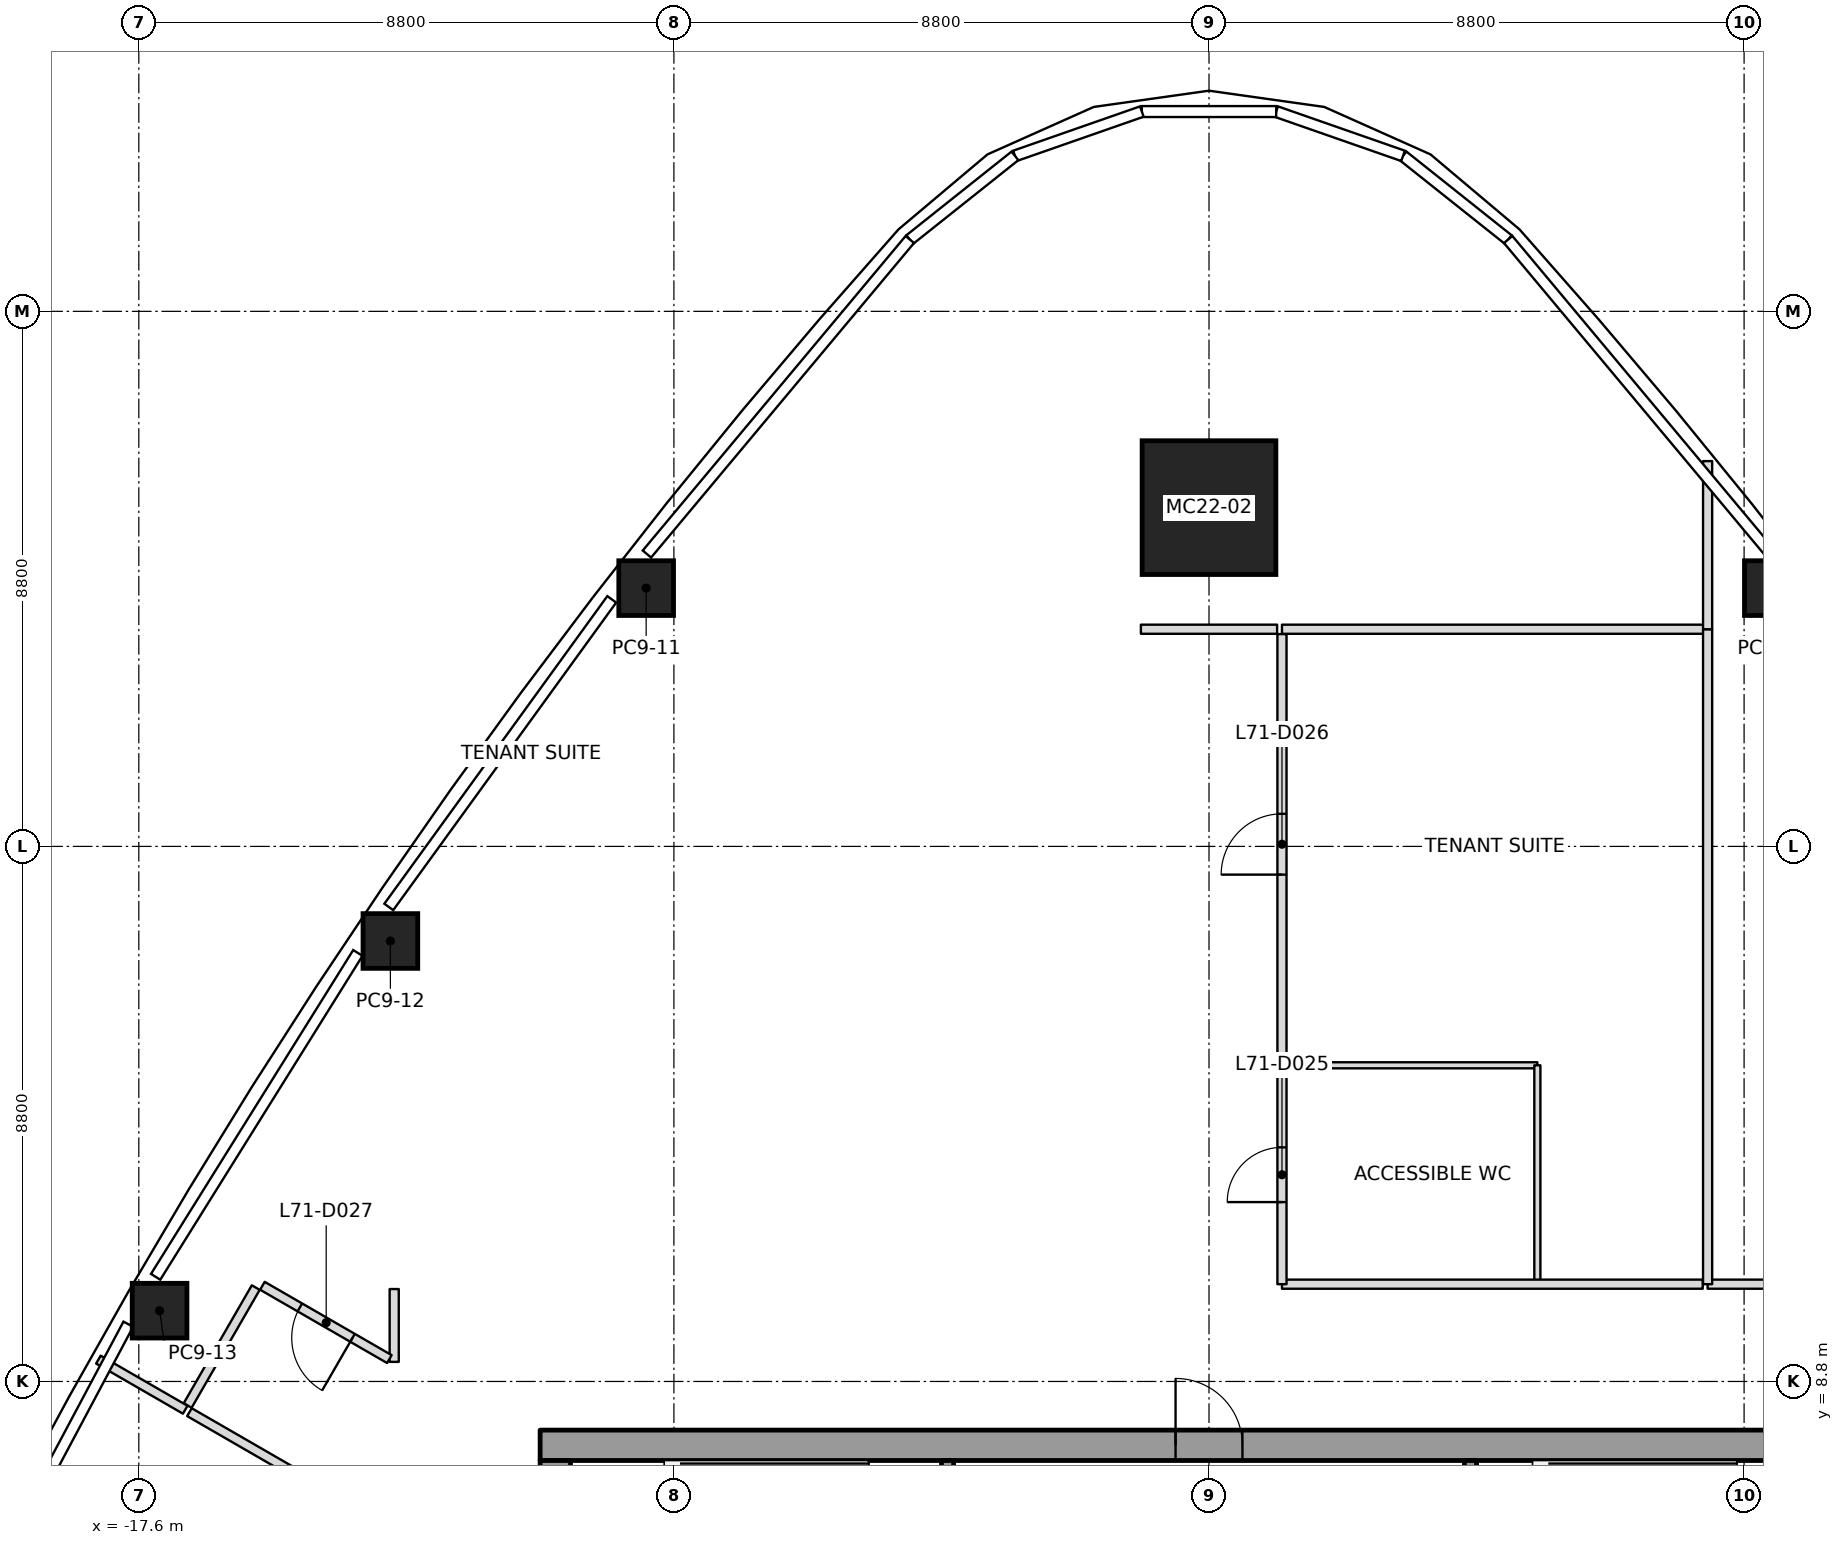
"""IFC4 building model, lengths in metres.
Left out: names, types, materials, properties, quantities, classifications, styles, units other than length and angle.
Written with IfcOpenShell. Run it as: python <this file> out.ifc"""

import sys

from ifc_helpers import new_model, si_unit, direction, frame, frame_2d, origin, origin_2d, place, context, subcontext, project, spatial, rectangle, extrude, element, fill, save


model = new_model("IFC4")
c1 = context("Model", 3, precision=1e-05, world=origin(), true_north=direction((0.0, 1.0)))
c2 = subcontext(c1, "Body", "Model", "MODEL_VIEW")
j1 = project(units=[si_unit("LENGTHUNIT", "METRE"), si_unit("PLANEANGLEUNIT", "RADIAN")], contexts=[c1])
p1 = place(None, origin())
s1 = spatial("IfcSite", under=j1, at=p1, CompositionType="ELEMENT")
p2 = place(p1, origin())
s2 = spatial("IfcBuilding", under=s1, at=p2, CompositionType="ELEMENT")
p3 = place(p2, frame((0.0, 0.0, 311.0)))
s3 = spatial("IfcBuildingStorey", under=s2, at=p3, CompositionType="ELEMENT", Elevation=311.0)
p4 = place(p3, frame((0.0, 23.172, 0.0), z_axis=(0.0, -0.031966077398, 0.999488954364), x_axis=(1.0, 0.0, 0.0)))
e1 = element("IfcColumn", 1, at=p4, inside=s3, PredefinedType="COLUMN", context=c2, shape_type="SweptSolid", body=[
    extrude(rectangle(XDim=2.2, YDim=2.2, at=origin_2d()), origin(), (0.0, 0.0, 1.0), 4.002),
])
for number, where, z_axis, x_axis in (
    (2, (9.256, 21.848, 0.0), (-0.0, -0.02, 1.0), (-0.614, 0.789, 0.016)),
    (3, (-9.256, 21.848, 0.0), (0.0, -0.02, 1.0), (0.614, 0.789, 0.016)),
):
    element("IfcColumn", number, at=place(p3, frame(where, z_axis=z_axis, x_axis=x_axis)), inside=s3, PredefinedType="COLUMN", context=c2, shape_type="SweptSolid", body=[
        extrude(rectangle(XDim=0.9, YDim=0.9, at=origin_2d()), origin(), (0.0, 0.0, 1.0), 4.001),
    ])
p5 = place(p3, frame((-13.463, 16.044, 0.0), z_axis=(0.00530952661, -0.013121243922, 0.999899815924), x_axis=(0.558539524226, 0.829440110709, 0.007918498852)))
e4 = element("IfcColumn", 4, at=p5, inside=s3, PredefinedType="COLUMN", context=c2, shape_type="SweptSolid", body=[
    extrude(rectangle(XDim=0.9, YDim=0.9, at=origin_2d()), origin(), (0.0, 0.0, 1.0), 4.0),
])
p6 = place(p3, frame((-17.259, 9.964, 0.0), z_axis=(0.009887049298, -0.00573692984, 0.999934664812), x_axis=(0.499975560967, 0.866039512843, 2.5126546e-05)))
e5 = element("IfcColumn", 5, at=p6, inside=s3, PredefinedType="COLUMN", context=c2, shape_type="SweptSolid", body=[
    extrude(rectangle(XDim=0.9, YDim=0.9, at=origin_2d()), origin(), (0.0, 0.0, 1.0), 4.0),
])
p7 = place(p3, frame((-11.0, 7.75, 0.0), z_axis=(0.0, 0.0, 1.0), x_axis=(1.0, 0.0, 0.0)))
e6 = element("IfcWall", 6, at=p7, inside=s3, PredefinedType="SHEAR", context=c2, shape_type="SweptSolid", body=[
    extrude(rectangle(XDim=22.0, YDim=0.5, at=frame_2d((11.0, 0.0))), origin(), (0.0, 0.0, 1.0), 4.0),
])
p8 = place(p7, frame((10.45, 0.0, 0.0)))
e7 = element("IfcOpeningElement", 7, at=p8, cuts=e6, PredefinedType="OPENING", context=c2, shape_type="SweptSolid", body=[
    extrude(rectangle(XDim=1.1, YDim=2.1, at=frame_2d((0.55, 1.05))), frame((0.0, 0.25, 0.0), z_axis=(0.0, -1.0, 0.0), x_axis=(1.0, 0.0, 0.0)), (0.0, 0.0, 1.0), 0.5),
])
p9 = place(p3, frame((-10.75, -7.5, 0.0), z_axis=(0.0, 0.0, 1.0), x_axis=(0.0, 1.0, 0.0)))
e8 = element("IfcWall", 8, at=p9, inside=s3, PredefinedType="SHEAR", context=c2, shape_type="SweptSolid", body=[
    extrude(rectangle(XDim=15.0, YDim=0.5, at=frame_2d((7.5, 0.0))), origin(), (0.0, 0.0, 1.0), 4.0),
])
p10 = place(p9, frame((6.6, 0.0, 0.0)))
e9 = element("IfcOpeningElement", 9, at=p10, cuts=e8, PredefinedType="OPENING", context=c2, shape_type="SweptSolid", body=[
    extrude(rectangle(XDim=1.8, YDim=2.1, at=frame_2d((0.9, 1.05))), frame((0.0, 0.25, 0.0), z_axis=(0.0, -1.0, 0.0), x_axis=(1.0, 0.0, 0.0)), (0.0, 0.0, 1.0), 0.5),
])
p11 = place(p3, frame((-4.3, 4.6, 0.0), z_axis=(0.0, 0.0, 1.0), x_axis=(0.0, 1.0, 0.0)))
e10 = element("IfcWall", 10, at=p11, inside=s3, PredefinedType="SOLIDWALL", context=c2, shape_type="SweptSolid", body=[
    extrude(rectangle(XDim=2.9, YDim=0.2, at=frame_2d((1.45, 0.0))), origin(), (0.0, 0.0, 1.0), 3.85),
])
p12 = place(p11, frame((0.9, 0.0, 0.0)))
e11 = element("IfcOpeningElement", 11, at=p12, cuts=e10, PredefinedType="OPENING", context=c2, shape_type="SweptSolid", body=[
    extrude(rectangle(XDim=1.1, YDim=2.1, at=frame_2d((0.55, 1.05))), frame((0.0, 0.1, 0.0), z_axis=(0.0, -1.0, 0.0), x_axis=(1.0, 0.0, 0.0)), (0.0, 0.0, 1.0), 0.2),
])
p13 = place(p3, frame((4.3, 7.5, 0.0), z_axis=(0.0, 0.0, 1.0), x_axis=(0.0, -1.0, 0.0)))
e12 = element("IfcWall", 12, at=p13, inside=s3, PredefinedType="SOLIDWALL", context=c2, shape_type="SweptSolid", body=[
    extrude(rectangle(XDim=2.9, YDim=0.2, at=frame_2d((1.45, 0.0))), origin(), (0.0, 0.0, 1.0), 3.85),
])
p14 = place(p13, frame((0.9, 0.0, 0.0)))
e13 = element("IfcOpeningElement", 13, at=p14, cuts=e12, PredefinedType="OPENING", context=c2, shape_type="SweptSolid", body=[
    extrude(rectangle(XDim=1.1, YDim=2.1, at=frame_2d((0.55, 1.05))), frame((0.0, 0.1, 0.0), z_axis=(0.0, -1.0, 0.0), x_axis=(1.0, 0.0, 0.0)), (0.0, 0.0, 1.0), 0.2),
])
p15 = place(p3, frame((-16.837, 8.335, 0.0), z_axis=(0.0, 0.0, 1.0), x_axis=(-0.866084496772, 0.499897633972, 0.0)))
e14 = element("IfcWall", 14, at=p15, inside=s3, PredefinedType="PARTITIONING", context=c2, shape_type="SweptSolid", body=[
    extrude(rectangle(XDim=1.649, YDim=0.15, at=frame_2d((0.824, 0.0))), origin(), (0.0, 0.0, 1.0), 3.234),
])
p16 = place(p3, frame((1.2, 21.172, 0.0), z_axis=(0.0, 0.0, 1.0), x_axis=(1.0, 0.0, 0.0)))
e15 = element("IfcWall", 15, at=p16, inside=s3, PredefinedType="PARTITIONING", context=c2, shape_type="SweptSolid", body=[
    extrude(rectangle(XDim=7.0, YDim=0.15, at=frame_2d((3.5, 0.0))), origin(), (0.0, 0.0, 1.0), 3.443),
])
p17 = place(p3, frame((8.2, 10.4, 0.0), z_axis=(0.0, 0.0, 1.0), x_axis=(0.0, 1.0, 0.0)))
e16 = element("IfcWall", 16, at=p17, inside=s3, PredefinedType="PARTITIONING", context=c2, shape_type="SweptSolid", body=[
    extrude(rectangle(XDim=10.772, YDim=0.15, at=frame_2d((5.386, 0.0))), origin(), (0.0, 0.0, 1.0), 3.317),
])
p18 = place(p3, frame((8.2, 21.172, 0.0), z_axis=(0.0, 0.0, 1.0), x_axis=(0.0, 1.0, 0.0)))
e17 = element("IfcWall", 17, at=p18, inside=s3, PredefinedType="PARTITIONING", context=c2, shape_type="SweptSolid", body=[
    extrude(rectangle(XDim=2.765, YDim=0.15, at=frame_2d((1.383, 0.0))), origin(), (0.0, 0.0, 1.0), 3.234),
])
p19 = place(p3, frame((-16.768, 8.295, 0.0), z_axis=(0.0, 0.0, 1.0), x_axis=(0.866024577697, -0.500001430823, 0.0)))
e18 = element("IfcWall", 18, at=p19, inside=s3, PredefinedType="PARTITIONING", context=c2, shape_type="SweptSolid", body=[
    extrude(rectangle(XDim=3.889, YDim=0.15, at=frame_2d((1.944, 0.0))), origin(), (0.0, 0.0, 1.0), 3.45),
])
p20 = place(p3, frame((-15.677, 10.344, 0.0), z_axis=(0.0, 0.0, 1.0), x_axis=(-0.49994888933, -0.866054910533, 0.0)))
e19 = element("IfcWall", 19, at=p20, inside=s3, PredefinedType="PARTITIONING", context=c2, shape_type="SweptSolid", body=[
    extrude(rectangle(XDim=2.24, YDim=0.15, at=frame_2d((1.12, 0.0))), origin(), (0.0, 0.0, 1.0), 3.45),
])
p21 = place(p3, frame((-13.4, 10.32, 0.0), z_axis=(0.0, 0.0, 1.0), x_axis=(0.0, -1.0, 0.0)))
e20 = element("IfcWall", 20, at=p21, inside=s3, PredefinedType="PARTITIONING", context=c2, shape_type="SweptSolid", body=[
    extrude(rectangle(XDim=1.198, YDim=0.15, at=frame_2d((0.599, 0.0))), origin(), (0.0, 0.0, 1.0), 3.45),
])
p22 = place(p3, frame((-13.479, 9.168, 0.0), z_axis=(0.0, 0.0, 1.0), x_axis=(-0.866028773314, 0.499994163758, 0.0)))
e21 = element("IfcWall", 21, at=p22, inside=s3, PredefinedType="PARTITIONING", context=c2, shape_type="SweptSolid", body=[
    extrude(rectangle(XDim=2.411, YDim=0.15, at=frame_2d((1.206, 0.0))), origin(), (0.0, 0.0, 1.0), 3.45),
])
p23 = place(p22, frame((0.7, 0.0, 0.0)))
e22 = element("IfcOpeningElement", 22, at=p23, cuts=e21, PredefinedType="OPENING", context=c2, shape_type="SweptSolid", body=[
    extrude(rectangle(XDim=1.0, YDim=2.1, at=frame_2d((0.5, 1.05))), frame((0.0, 0.075, 0.0), z_axis=(0.0, -1.0, 0.0), x_axis=(1.0, 0.0, 0.0)), (0.0, 0.0, 1.0), 0.15),
])
p24 = place(p3, frame((1.12, 21.172, 0.0), z_axis=(0.0, 0.0, 1.0), x_axis=(-1.0, 0.0, 0.0)))
e23 = element("IfcWall", 23, at=p24, inside=s3, PredefinedType="PARTITIONING", context=c2, shape_type="SweptSolid", body=[
    extrude(rectangle(XDim=2.24, YDim=0.15, at=frame_2d((1.12, 0.0))), origin(), (0.0, 0.0, 1.0), 3.233),
])
p25 = place(p3, frame((8.12, 10.4, 0.0), z_axis=(0.0, 0.0, 1.0), x_axis=(-1.0, 0.0, 0.0)))
e24 = element("IfcWall", 24, at=p25, inside=s3, PredefinedType="PARTITIONING", context=c2, shape_type="SweptSolid", body=[
    extrude(rectangle(XDim=6.92, YDim=0.15, at=frame_2d((3.46, 0.0))), origin(), (0.0, 0.0, 1.0), 3.45),
])
p26 = place(p3, frame((1.2, 10.4, 0.0), z_axis=(0.0, 0.0, 1.0), x_axis=(0.0, 1.0, 0.0)))
e25 = element("IfcWall", 25, at=p26, inside=s3, PredefinedType="PARTITIONING", context=c2, shape_type="SweptSolid", body=[
    extrude(rectangle(XDim=10.692, YDim=0.15, at=frame_2d((5.346, 0.0))), origin(), (0.0, 0.0, 1.0), 3.317),
])
p27 = place(p26, frame((1.35, 0.0, 0.0)))
e26 = element("IfcOpeningElement", 26, at=p27, cuts=e25, PredefinedType="OPENING", context=c2, shape_type="SweptSolid", body=[
    extrude(rectangle(XDim=0.9, YDim=2.1, at=frame_2d((0.45, 1.05))), frame((0.0, 0.075, 0.0), z_axis=(0.0, -1.0, 0.0), x_axis=(1.0, 0.0, 0.0)), (0.0, 0.0, 1.0), 0.15),
])
p28 = place(p26, frame((6.736, 0.0, 0.0)))
e27 = element("IfcOpeningElement", 27, at=p28, cuts=e25, PredefinedType="OPENING", context=c2, shape_type="SweptSolid", body=[
    extrude(rectangle(XDim=1.0, YDim=2.1, at=frame_2d((0.5, 1.05))), frame((0.0, 0.075, 0.0), z_axis=(0.0, -1.0, 0.0), x_axis=(1.0, 0.0, 0.0)), (0.0, 0.0, 1.0), 0.15),
])
p29 = place(p3, frame((13.32, 10.4, 0.0), z_axis=(0.0, 0.0, 1.0), x_axis=(-1.0, 0.0, 0.0)))
e28 = element("IfcWall", 28, at=p29, inside=s3, PredefinedType="PARTITIONING", context=c2, shape_type="SweptSolid", body=[
    extrude(rectangle(XDim=5.12, YDim=0.15, at=frame_2d((2.56, 0.0))), origin(), (0.0, 0.0, 1.0), 3.443),
])
p30 = place(p29, frame((2.02, 0.0, 0.0)))
e29 = element("IfcOpeningElement", 29, at=p30, cuts=e28, PredefinedType="OPENING", context=c2, shape_type="SweptSolid", body=[
    extrude(rectangle(XDim=1.0, YDim=2.1, at=frame_2d((0.5, 1.05))), frame((0.0, 0.075, 0.0), z_axis=(0.0, -1.0, 0.0), x_axis=(1.0, 0.0, 0.0)), (0.0, 0.0, 1.0), 0.15),
])
p31 = place(p3, frame((1.23, 14.0, 0.0), z_axis=(0.0, 0.0, 1.0), x_axis=(1.0, 0.0, 0.0)))
e30 = element("IfcWall", 30, at=p31, inside=s3, PredefinedType="PARTITIONING", context=c2, shape_type="SweptSolid", body=[
    extrude(rectangle(XDim=4.17, YDim=0.1, at=frame_2d((2.085, 0.0))), origin(), (0.0, 0.0, 1.0), 3.45),
])
p32 = place(p3, frame((5.4, 14.0, 0.0), z_axis=(0.0, 0.0, 1.0), x_axis=(0.0, -1.0, 0.0)))
e31 = element("IfcWall", 31, at=p32, inside=s3, PredefinedType="PARTITIONING", context=c2, shape_type="SweptSolid", body=[
    extrude(rectangle(XDim=3.57, YDim=0.1, at=frame_2d((1.785, 0.0))), origin(), (0.0, 0.0, 1.0), 3.317),
])
p33 = place(p27, origin())
e32 = element("IfcDoor", 32, at=p33, inside=s3, OperationType="SINGLE_SWING_RIGHT", PredefinedType="DOOR", context=c2, shape_type="SweptSolid", body=[
    extrude(rectangle(XDim=0.9, YDim=2.1, at=frame_2d((0.45, 1.05))), frame((0.0, 0.025, 0.0), z_axis=(0.0, -1.0, 0.0), x_axis=(1.0, 0.0, 0.0)), (0.0, 0.0, 1.0), 0.05),
])
fill(e26, e32)
p34 = place(p28, origin())
e33 = element("IfcDoor", 33, at=p34, inside=s3, OperationType="SINGLE_SWING_LEFT", PredefinedType="DOOR", context=c2, shape_type="SweptSolid", body=[
    extrude(rectangle(XDim=1.0, YDim=2.1, at=frame_2d((0.5, 1.05))), frame((0.0, 0.025, 0.0), z_axis=(0.0, -1.0, 0.0), x_axis=(1.0, 0.0, 0.0)), (0.0, 0.0, 1.0), 0.05),
])
fill(e27, e33)
p35 = place(p23, origin())
e34 = element("IfcDoor", 34, at=p35, inside=s3, OperationType="SINGLE_SWING_RIGHT", PredefinedType="DOOR", context=c2, shape_type="SweptSolid", body=[
    extrude(rectangle(XDim=1.0, YDim=2.1, at=frame_2d((0.5, 1.05))), frame((0.0, 0.025, 0.0), z_axis=(0.0, -1.0, 0.0), x_axis=(1.0, 0.0, 0.0)), (0.0, 0.0, 1.0), 0.05),
])
fill(e22, e34)
p36 = place(p8, origin())
e35 = element("IfcDoor", 35, at=p36, inside=s3, OperationType="SINGLE_SWING_LEFT", PredefinedType="DOOR", context=c2, shape_type="SweptSolid", body=[
    extrude(rectangle(XDim=1.1, YDim=2.1, at=frame_2d((0.55, 1.05))), frame((0.0, 0.025, 0.0), z_axis=(0.0, -1.0, 0.0), x_axis=(1.0, 0.0, 0.0)), (0.0, 0.0, 1.0), 0.05),
])
fill(e7, e35)
save(model, sys.argv[1])
